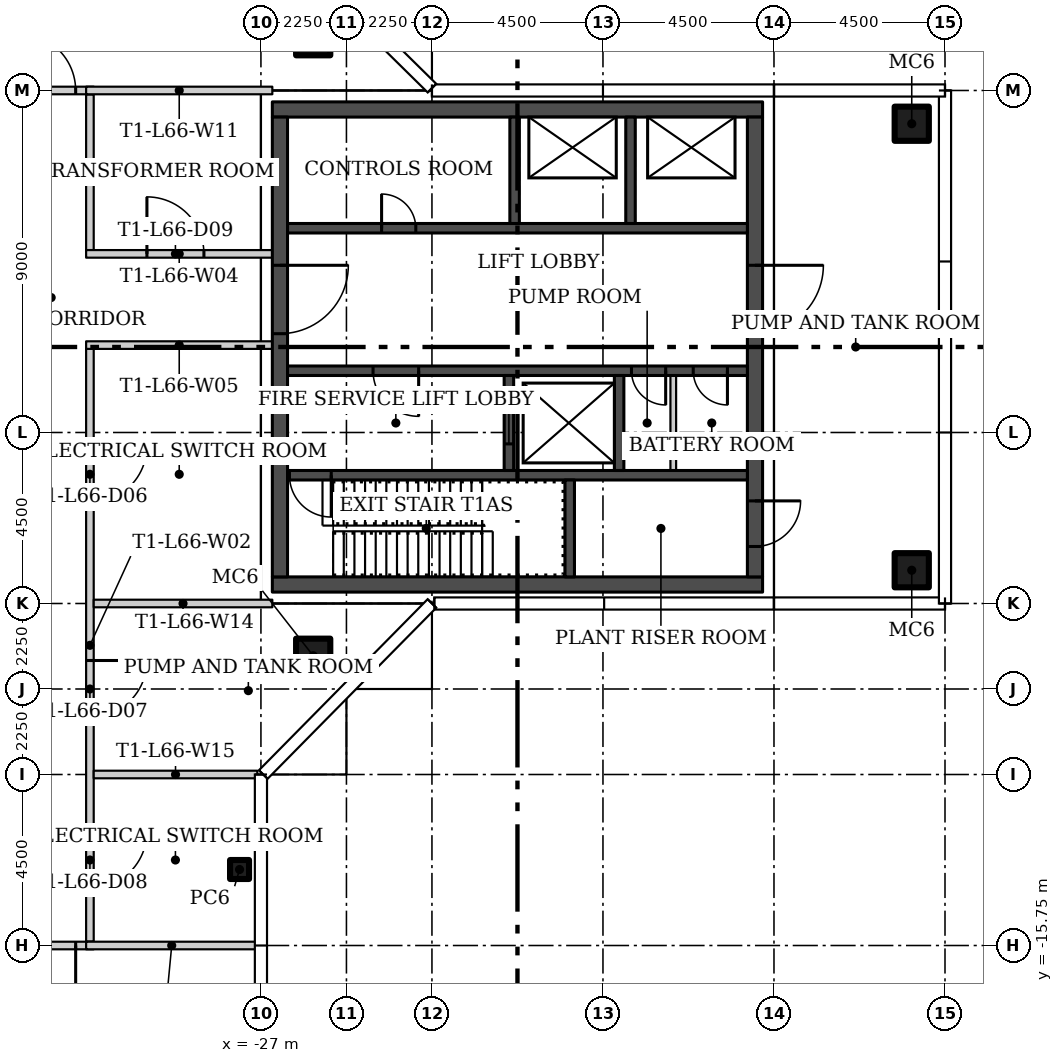
"""IFC4 building model, lengths in metres.
Left out: names, types, materials, properties, quantities, classifications, styles, units other than length and angle.
Written with IfcOpenShell. Run it as: python <this file> out.ifc"""

import sys

from ifc_helpers import new_model, si_unit, direction, frame, frame_2d, origin, origin_2d, place, context, subcontext, project, spatial, rectangle, hollow_rectangle, extrude, element, fill, save


model = new_model("IFC4")
c1 = context("Model", 3, precision=1e-05, world=origin(), true_north=direction((0.0, 1.0)))
c2 = subcontext(c1, "Body", "Model", "MODEL_VIEW")
j1 = project(units=[si_unit("LENGTHUNIT", "METRE"), si_unit("PLANEANGLEUNIT", "RADIAN")], contexts=[c1])
p1 = place(None, origin())
s1 = spatial("IfcSite", under=j1, at=p1, CompositionType="ELEMENT")
p2 = place(p1, origin())
s2 = spatial("IfcBuilding", under=s1, at=p2, CompositionType="ELEMENT")
p3 = place(p2, frame((0.0, 0.0, 273.3)))
s3 = spatial("IfcBuildingStorey", under=s2, at=p3, CompositionType="ELEMENT", Elevation=273.3)
for number, where in (
    (1, (-25.625, 8.125, 0.0)),
    (2, (-25.625, -8.125, 0.0)),
    (3, (-9.875, -5.875, 0.0)),
    (4, (-9.875, 5.875, 0.0)),
):
    element("IfcColumn", number, at=place(p3, frame(where)), inside=s3, PredefinedType="COLUMN", context=c2, shape_type="SweptSolid", body=[
        extrude(hollow_rectangle(XDim=0.9, YDim=0.9, WallThickness=0.036, at=origin_2d()), origin(), (0.0, 0.0, 1.0), 4.55),
    ])
p4 = place(p3, frame((-27.562, -13.75, 0.0)))
e5 = element("IfcColumn", 5, at=p4, inside=s3, PredefinedType="COLUMN", context=c2, shape_type="SweptSolid", body=[
    extrude(hollow_rectangle(XDim=0.5, YDim=0.5, WallThickness=0.016, at=origin_2d()), origin(), (0.0, 0.0, 1.0), 4.55),
])
p5 = place(p3, frame((-31.5, 6.65, 0.0), z_axis=(0.0, 0.0, 1.0), x_axis=(0.0, -1.0, 0.0)))
e6 = element("IfcWall", 6, at=p5, inside=s3, PredefinedType="PARTITIONING", context=c2, shape_type="SweptSolid", body=[
    extrude(rectangle(XDim=4.1, YDim=0.2, at=frame_2d((2.05, 0.0))), origin(), (0.0, 0.0, 1.0), 4.55),
])
p6 = place(p3, frame((-31.5, -0.05, 0.0), z_axis=(0.0, 0.0, 1.0), x_axis=(0.0, -1.0, 0.0)))
e7 = element("IfcWall", 7, at=p6, inside=s3, PredefinedType="PARTITIONING", context=c2, shape_type="SweptSolid", body=[
    extrude(rectangle(XDim=15.6, YDim=0.2, at=frame_2d((7.8, 0.0))), origin(), (0.0, 0.0, 1.0), 4.55),
])
p7 = place(p6, frame((2.55, 0.0, 0.0)))
e8 = element("IfcOpeningElement", 8, at=p7, cuts=e7, PredefinedType="OPENING", context=c2, shape_type="SweptSolid", body=[
    extrude(rectangle(XDim=1.5, YDim=2.4, at=frame_2d((0.75, 1.2))), frame((0.0, 0.11, 0.0), z_axis=(0.0, -1.0, 0.0), x_axis=(1.0, 0.0, 0.0)), (0.0, 0.0, 1.0), 0.22),
])
p8 = place(p6, frame((8.2, 0.0, 0.0)))
e9 = element("IfcOpeningElement", 9, at=p8, cuts=e7, PredefinedType="OPENING", context=c2, shape_type="SweptSolid", body=[
    extrude(rectangle(XDim=1.5, YDim=2.4, at=frame_2d((0.75, 1.2))), frame((0.0, 0.11, 0.0), z_axis=(0.0, -1.0, 0.0), x_axis=(1.0, 0.0, 0.0)), (0.0, 0.0, 1.0), 0.22),
])
p9 = place(p6, frame((12.7, 0.0, 0.0)))
e10 = element("IfcOpeningElement", 10, at=p9, cuts=e7, PredefinedType="OPENING", context=c2, shape_type="SweptSolid", body=[
    extrude(rectangle(XDim=1.5, YDim=2.4, at=frame_2d((0.75, 1.2))), frame((0.0, 0.11, 0.0), z_axis=(0.0, -1.0, 0.0), x_axis=(1.0, 0.0, 0.0)), (0.0, 0.0, 1.0), 0.22),
])
p10 = place(p3, frame((-31.6, 2.45, 0.0)))
e11 = element("IfcWall", 11, at=p10, inside=s3, PredefinedType="PARTITIONING", context=c2, shape_type="SweptSolid", body=[
    extrude(rectangle(XDim=4.9, YDim=0.2, at=frame_2d((2.45, 0.0))), origin(), (0.0, 0.0, 1.0), 4.55),
])
p11 = place(p10, frame((1.6, 0.0, 0.0)))
e12 = element("IfcOpeningElement", 12, at=p11, cuts=e11, PredefinedType="OPENING", context=c2, shape_type="SweptSolid", body=[
    extrude(rectangle(XDim=1.5, YDim=2.4, at=frame_2d((0.75, 1.2))), frame((0.0, 0.11, 0.0), z_axis=(0.0, -1.0, 0.0), x_axis=(1.0, 0.0, 0.0)), (0.0, 0.0, 1.0), 0.22),
])
p12 = place(p3, frame((-26.7, 0.05, 0.0), z_axis=(0.0, 0.0, 1.0), x_axis=(-1.0, 0.0, 0.0)))
e13 = element("IfcWall", 13, at=p12, inside=s3, PredefinedType="PARTITIONING", context=c2, shape_type="SweptSolid", body=[
    extrude(rectangle(XDim=4.9, YDim=0.2, at=frame_2d((2.45, 0.0))), origin(), (0.0, 0.0, 1.0), 4.55),
])
p13 = place(p3, frame((-33.85, 6.75, 0.0)))
e14 = element("IfcWall", 14, at=p13, inside=s3, PredefinedType="PARTITIONING", context=c2, shape_type="SweptSolid", body=[
    extrude(rectangle(XDim=2.45, YDim=0.2, at=frame_2d((1.225, 0.0))), origin(), (0.0, 0.0, 1.0), 4.55),
])
p14 = place(p13, frame((0.475, 0.0, 0.0)))
e15 = element("IfcOpeningElement", 15, at=p14, cuts=e14, PredefinedType="OPENING", context=c2, shape_type="SweptSolid", body=[
    extrude(rectangle(XDim=1.5, YDim=2.4, at=frame_2d((0.75, 1.2))), frame((0.0, 0.11, 0.0), z_axis=(0.0, -1.0, 0.0), x_axis=(1.0, 0.0, 0.0)), (0.0, 0.0, 1.0), 0.22),
])
p15 = place(p3, frame((-31.4, -15.75, 0.0), z_axis=(0.0, 0.0, 1.0), x_axis=(-1.0, 0.0, 0.0)))
e16 = element("IfcWall", 16, at=p15, inside=s3, PredefinedType="PARTITIONING", context=c2, shape_type="SweptSolid", body=[
    extrude(rectangle(XDim=2.45, YDim=0.2, at=frame_2d((1.225, 0.0))), origin(), (0.0, 0.0, 1.0), 4.55),
])
p16 = place(p15, frame((0.475, 0.0, 0.0)))
e17 = element("IfcOpeningElement", 17, at=p16, cuts=e16, PredefinedType="OPENING", context=c2, shape_type="SweptSolid", body=[
    extrude(rectangle(XDim=1.5, YDim=2.4, at=frame_2d((0.75, 1.2))), frame((0.0, 0.11, 0.0), z_axis=(0.0, -1.0, 0.0), x_axis=(1.0, 0.0, 0.0)), (0.0, 0.0, 1.0), 0.22),
])
p17 = place(p3, frame((-26.7, 6.75, 0.0), z_axis=(0.0, 0.0, 1.0), x_axis=(-1.0, 0.0, 0.0)))
e18 = element("IfcWall", 18, at=p17, inside=s3, PredefinedType="PARTITIONING", context=c2, shape_type="SweptSolid", body=[
    extrude(rectangle(XDim=4.9, YDim=0.2, at=frame_2d((2.45, 0.0))), origin(), (0.0, 0.0, 1.0), 4.55),
])
p18 = place(p3, frame((-31.4, -6.75, 0.0)))
e19 = element("IfcWall", 19, at=p18, inside=s3, PredefinedType="PARTITIONING", context=c2, shape_type="SweptSolid", body=[
    extrude(rectangle(XDim=4.7, YDim=0.2, at=frame_2d((2.35, 0.0))), origin(), (0.0, 0.0, 1.0), 4.55),
])
p19 = place(p3, frame((-31.4, -11.25, 0.0)))
e20 = element("IfcWall", 20, at=p19, inside=s3, PredefinedType="PARTITIONING", context=c2, shape_type="SweptSolid", body=[
    extrude(rectangle(XDim=4.305, YDim=0.2, at=frame_2d((2.152, 0.0))), origin(), (0.0, 0.0, 1.0), 4.55),
])
p20 = place(p3, frame((-31.6, -15.75, 0.0)))
e21 = element("IfcWall", 21, at=p20, inside=s3, PredefinedType="PARTITIONING", context=c2, shape_type="SweptSolid", body=[
    extrude(rectangle(XDim=4.505, YDim=0.2, at=frame_2d((2.252, 0.0))), origin(), (0.0, 0.0, 1.0), 4.55),
])
for number, where in (
    (22, (-26.7, -6.25, 0.0)),
    (23, (-26.7, 6.25, 0.0)),
):
    element("IfcWall", number, at=place(p3, frame(where)), inside=s3, PredefinedType="SHEAR", context=c2, shape_type="SweptSolid", body=[
        extrude(rectangle(XDim=12.9, YDim=0.4, at=frame_2d((6.45, 0.0))), origin(), (0.0, 0.0, 1.0), 4.55),
    ])
p21 = place(p3, frame((-26.5, 6.05, 0.0), z_axis=(0.0, 0.0, 1.0), x_axis=(0.0, -1.0, 0.0)))
e24 = element("IfcWall", 24, at=p21, inside=s3, PredefinedType="SHEAR", context=c2, shape_type="SweptSolid", body=[
    extrude(rectangle(XDim=12.1, YDim=0.4, at=frame_2d((6.05, 0.0))), origin(), (0.0, 0.0, 1.0), 4.55),
])
p22 = place(p21, frame((3.9, 0.0, 0.0)))
e25 = element("IfcOpeningElement", 25, at=p22, cuts=e24, PredefinedType="OPENING", context=c2, shape_type="SweptSolid", body=[
    extrude(rectangle(XDim=1.8, YDim=2.4, at=frame_2d((0.9, 1.2))), frame((0.0, 0.21, 0.0), z_axis=(0.0, -1.0, 0.0), x_axis=(1.0, 0.0, 0.0)), (0.0, 0.0, 1.0), 0.42),
])
p23 = place(p3, frame((-14.0, 6.05, 0.0), z_axis=(0.0, 0.0, 1.0), x_axis=(0.0, -1.0, 0.0)))
e26 = element("IfcWall", 26, at=p23, inside=s3, PredefinedType="SHEAR", context=c2, shape_type="SweptSolid", body=[
    extrude(rectangle(XDim=12.1, YDim=0.4, at=frame_2d((6.05, 0.0))), origin(), (0.0, 0.0, 1.0), 4.55),
])
p24 = place(p23, frame((10.1, 0.0, 0.0)))
e27 = element("IfcOpeningElement", 27, at=p24, cuts=e26, PredefinedType="OPENING", context=c2, shape_type="SweptSolid", body=[
    extrude(rectangle(XDim=1.2, YDim=2.1, at=frame_2d((0.6, 1.05))), frame((0.0, 0.21, 0.0), z_axis=(0.0, -1.0, 0.0), x_axis=(1.0, 0.0, 0.0)), (0.0, 0.0, 1.0), 0.42),
])
p25 = place(p23, frame((3.9, 0.0, 0.0)))
e28 = element("IfcOpeningElement", 28, at=p25, cuts=e26, PredefinedType="OPENING", context=c2, shape_type="SweptSolid", body=[
    extrude(rectangle(XDim=1.8, YDim=2.4, at=frame_2d((0.9, 1.2))), frame((0.0, 0.21, 0.0), z_axis=(0.0, -1.0, 0.0), x_axis=(1.0, 0.0, 0.0)), (0.0, 0.0, 1.0), 0.42),
])
p26 = place(p3, frame((-14.2, -3.375, 0.0), z_axis=(0.0, 0.0, 1.0), x_axis=(-1.0, 0.0, 0.0)))
e29 = element("IfcWall", 29, at=p26, inside=s3, PredefinedType="SHEAR", context=c2, shape_type="SweptSolid", body=[
    extrude(rectangle(XDim=12.1, YDim=0.25, at=frame_2d((6.05, 0.0))), origin(), (0.0, 0.0, 1.0), 4.55),
])
p27 = place(p26, frame((10.95, 0.0, 0.0)))
e30 = element("IfcOpeningElement", 30, at=p27, cuts=e29, PredefinedType="OPENING", context=c2, shape_type="SweptSolid", body=[
    extrude(rectangle(XDim=1.1, YDim=2.1, at=frame_2d((0.55, 1.05))), frame((0.0, 0.135, 0.0), z_axis=(0.0, -1.0, 0.0), x_axis=(1.0, 0.0, 0.0)), (0.0, 0.0, 1.0), 0.27),
])
p28 = place(p3, frame((-18.875, -6.05, 0.0), z_axis=(0.0, 0.0, 1.0), x_axis=(0.0, 1.0, 0.0)))
e31 = element("IfcWall", 31, at=p28, inside=s3, PredefinedType="SHEAR", context=c2, shape_type="SweptSolid", body=[
    extrude(rectangle(XDim=2.55, YDim=0.25, at=frame_2d((1.275, 0.0))), origin(), (0.0, 0.0, 1.0), 4.55),
])
p29 = place(p3, frame((-14.2, -0.625, 0.0), z_axis=(0.0, 0.0, 1.0), x_axis=(-1.0, 0.0, 0.0)))
e32 = element("IfcWall", 32, at=p29, inside=s3, PredefinedType="SHEAR", context=c2, shape_type="SweptSolid", body=[
    extrude(rectangle(XDim=12.1, YDim=0.25, at=frame_2d((6.05, 0.0))), origin(), (0.0, 0.0, 1.0), 4.55),
])
p30 = place(p29, frame((8.65, 0.0, 0.0)))
e33 = element("IfcOpeningElement", 33, at=p30, cuts=e32, PredefinedType="OPENING", context=c2, shape_type="SweptSolid", body=[
    extrude(rectangle(XDim=1.2, YDim=2.1, at=frame_2d((0.6, 1.05))), frame((0.0, 0.135, 0.0), z_axis=(0.0, -1.0, 0.0), x_axis=(1.0, 0.0, 0.0)), (0.0, 0.0, 1.0), 0.27),
])
p31 = place(p29, frame((2.15, 0.0, 0.0)))
e34 = element("IfcOpeningElement", 34, at=p31, cuts=e32, PredefinedType="OPENING", context=c2, shape_type="SweptSolid", body=[
    extrude(rectangle(XDim=0.9, YDim=2.1, at=frame_2d((0.45, 1.05))), frame((0.0, 0.135, 0.0), z_axis=(0.0, -1.0, 0.0), x_axis=(1.0, 0.0, 0.0)), (0.0, 0.0, 1.0), 0.27),
])
p32 = place(p29, frame((0.525, 0.0, 0.0)))
e35 = element("IfcOpeningElement", 35, at=p32, cuts=e32, PredefinedType="OPENING", context=c2, shape_type="SweptSolid", body=[
    extrude(rectangle(XDim=0.9, YDim=2.1, at=frame_2d((0.45, 1.05))), frame((0.0, 0.135, 0.0), z_axis=(0.0, -1.0, 0.0), x_axis=(1.0, 0.0, 0.0)), (0.0, 0.0, 1.0), 0.27),
])
p33 = place(p3, frame((-20.475, -3.25, 0.0), z_axis=(0.0, 0.0, 1.0), x_axis=(0.0, 1.0, 0.0)))
e36 = element("IfcWall", 36, at=p33, inside=s3, PredefinedType="SHEAR", context=c2, shape_type="SweptSolid", body=[
    extrude(rectangle(XDim=2.5, YDim=0.25, at=frame_2d((1.25, 0.0))), origin(), (0.0, 0.0, 1.0), 4.55),
])
p34 = place(p33, frame((0.7, 0.0, 0.0)))
e37 = element("IfcOpeningElement", 37, at=p34, cuts=e36, PredefinedType="OPENING", context=c2, shape_type="SweptSolid", body=[
    extrude(rectangle(XDim=1.1, YDim=2.1, at=frame_2d((0.55, 1.05))), frame((0.0, 0.135, 0.0), z_axis=(0.0, -1.0, 0.0), x_axis=(1.0, 0.0, 0.0)), (0.0, 0.0, 1.0), 0.27),
])
p35 = place(p3, frame((-17.575, -3.25, 0.0), z_axis=(0.0, 0.0, 1.0), x_axis=(0.0, 1.0, 0.0)))
e38 = element("IfcWall", 38, at=p35, inside=s3, PredefinedType="SHEAR", context=c2, shape_type="SweptSolid", body=[
    extrude(rectangle(XDim=2.5, YDim=0.25, at=frame_2d((1.25, 0.0))), origin(), (0.0, 0.0, 1.0), 4.55),
])
p36 = place(p3, frame((-16.15, -3.25, 0.0), z_axis=(0.0, 0.0, 1.0), x_axis=(0.0, 1.0, 0.0)))
e39 = element("IfcWall", 39, at=p36, inside=s3, PredefinedType="PARTITIONING", context=c2, shape_type="SweptSolid", body=[
    extrude(rectangle(XDim=2.5, YDim=0.15, at=frame_2d((1.25, 0.0))), origin(), (0.0, 0.0, 1.0), 4.55),
])
p37 = place(p3, frame((-26.3, 3.125, 0.0)))
e40 = element("IfcWall", 40, at=p37, inside=s3, PredefinedType="SHEAR", context=c2, shape_type="SweptSolid", body=[
    extrude(rectangle(XDim=12.1, YDim=0.25, at=frame_2d((6.05, 0.0))), origin(), (0.0, 0.0, 1.0), 4.55),
])
p38 = place(p37, frame((2.475, 0.0, 0.0)))
e41 = element("IfcOpeningElement", 41, at=p38, cuts=e40, PredefinedType="OPENING", context=c2, shape_type="SweptSolid", body=[
    extrude(rectangle(XDim=0.9, YDim=2.1, at=frame_2d((0.45, 1.05))), frame((0.0, 0.135, 0.0), z_axis=(0.0, -1.0, 0.0), x_axis=(1.0, 0.0, 0.0)), (0.0, 0.0, 1.0), 0.27),
])
for number, where, z_axis, x_axis in (
    (42, (-20.325, 3.25, 0.0), (0.0, 0.0, 1.0), (0.0, 1.0, 0.0)),
    (43, (-17.275, 3.25, 0.0), (0.0, 0.0, 1.0), (0.0, 1.0, 0.0)),
):
    element("IfcWall", number, at=place(p3, frame(where, z_axis=z_axis, x_axis=x_axis)), inside=s3, PredefinedType="SHEAR", context=c2, shape_type="SweptSolid", body=[
        extrude(rectangle(XDim=2.8, YDim=0.25, at=frame_2d((1.4, 0.0))), origin(), (0.0, 0.0, 1.0), 4.55),
    ])
p39 = place(p14, origin())
e44 = element("IfcDoor", 44, at=p39, inside=s3, OperationType="DOUBLE_DOOR_SINGLE_SWING", PredefinedType="DOOR", context=c2, shape_type="SweptSolid", body=[
    extrude(rectangle(XDim=1.5, YDim=2.4, at=frame_2d((0.75, 1.2))), frame((0.0, 0.025, 0.0), z_axis=(0.0, -1.0, 0.0), x_axis=(1.0, 0.0, 0.0)), (0.0, 0.0, 1.0), 0.05),
])
fill(e15, e44)
p40 = place(p16, origin())
e45 = element("IfcDoor", 45, at=p40, inside=s3, OperationType="DOUBLE_DOOR_SINGLE_SWING", PredefinedType="DOOR", context=c2, shape_type="SweptSolid", body=[
    extrude(rectangle(XDim=1.5, YDim=2.4, at=frame_2d((0.75, 1.2))), frame((0.0, 0.025, 0.0), z_axis=(0.0, -1.0, 0.0), x_axis=(1.0, 0.0, 0.0)), (0.0, 0.0, 1.0), 0.05),
])
fill(e17, e45)
p41 = place(p7, origin())
e46 = element("IfcDoor", 46, at=p41, inside=s3, OperationType="DOUBLE_DOOR_SINGLE_SWING", PredefinedType="DOOR", context=c2, shape_type="SweptSolid", body=[
    extrude(rectangle(XDim=1.5, YDim=2.4, at=frame_2d((0.75, 1.2))), frame((0.0, 0.025, 0.0), z_axis=(0.0, -1.0, 0.0), x_axis=(1.0, 0.0, 0.0)), (0.0, 0.0, 1.0), 0.05),
])
fill(e8, e46)
p42 = place(p8, origin())
e47 = element("IfcDoor", 47, at=p42, inside=s3, OperationType="DOUBLE_DOOR_SINGLE_SWING", PredefinedType="DOOR", context=c2, shape_type="SweptSolid", body=[
    extrude(rectangle(XDim=1.5, YDim=2.4, at=frame_2d((0.75, 1.2))), frame((0.0, 0.025, 0.0), z_axis=(0.0, -1.0, 0.0), x_axis=(1.0, 0.0, 0.0)), (0.0, 0.0, 1.0), 0.05),
])
fill(e9, e47)
p43 = place(p9, origin())
e48 = element("IfcDoor", 48, at=p43, inside=s3, OperationType="DOUBLE_DOOR_SINGLE_SWING", PredefinedType="DOOR", context=c2, shape_type="SweptSolid", body=[
    extrude(rectangle(XDim=1.5, YDim=2.4, at=frame_2d((0.75, 1.2))), frame((0.0, 0.025, 0.0), z_axis=(0.0, -1.0, 0.0), x_axis=(1.0, 0.0, 0.0)), (0.0, 0.0, 1.0), 0.05),
])
fill(e10, e48)
p44 = place(p11, origin())
e49 = element("IfcDoor", 49, at=p44, inside=s3, OperationType="DOUBLE_DOOR_SINGLE_SWING", PredefinedType="DOOR", context=c2, shape_type="SweptSolid", body=[
    extrude(rectangle(XDim=1.5, YDim=2.4, at=frame_2d((0.75, 1.2))), frame((0.0, 0.025, 0.0), z_axis=(0.0, -1.0, 0.0), x_axis=(1.0, 0.0, 0.0)), (0.0, 0.0, 1.0), 0.05),
])
fill(e12, e49)
p45 = place(p22, origin())
e50 = element("IfcDoor", 50, at=p45, inside=s3, OperationType="DOUBLE_DOOR_SINGLE_SWING", PredefinedType="DOOR", context=c2, shape_type="SweptSolid", body=[
    extrude(rectangle(XDim=1.8, YDim=2.4, at=frame_2d((0.9, 1.2))), frame((0.0, 0.025, 0.0), z_axis=(0.0, -1.0, 0.0), x_axis=(1.0, 0.0, 0.0)), (0.0, 0.0, 1.0), 0.05),
])
fill(e25, e50)
p46 = place(p24, origin())
e51 = element("IfcDoor", 51, at=p46, inside=s3, OperationType="SINGLE_SWING_RIGHT", PredefinedType="DOOR", context=c2, shape_type="SweptSolid", body=[
    extrude(rectangle(XDim=1.2, YDim=2.1, at=frame_2d((0.6, 1.05))), frame((0.0, 0.025, 0.0), z_axis=(0.0, -1.0, 0.0), x_axis=(1.0, 0.0, 0.0)), (0.0, 0.0, 1.0), 0.05),
])
fill(e27, e51)
p47 = place(p25, origin())
e52 = element("IfcDoor", 52, at=p47, inside=s3, OperationType="DOUBLE_DOOR_SINGLE_SWING", PredefinedType="DOOR", context=c2, shape_type="SweptSolid", body=[
    extrude(rectangle(XDim=1.8, YDim=2.4, at=frame_2d((0.9, 1.2))), frame((0.0, 0.025, 0.0), z_axis=(0.0, -1.0, 0.0), x_axis=(1.0, 0.0, 0.0)), (0.0, 0.0, 1.0), 0.05),
])
fill(e28, e52)
p48 = place(p27, origin())
e53 = element("IfcDoor", 53, at=p48, inside=s3, OperationType="SINGLE_SWING_RIGHT", PredefinedType="DOOR", context=c2, shape_type="SweptSolid", body=[
    extrude(rectangle(XDim=1.1, YDim=2.1, at=frame_2d((0.55, 1.05))), frame((0.0, 0.025, 0.0), z_axis=(0.0, -1.0, 0.0), x_axis=(1.0, 0.0, 0.0)), (0.0, 0.0, 1.0), 0.05),
])
fill(e30, e53)
p49 = place(p30, origin())
e54 = element("IfcDoor", 54, at=p49, inside=s3, OperationType="SINGLE_SWING_RIGHT", PredefinedType="DOOR", context=c2, shape_type="SweptSolid", body=[
    extrude(rectangle(XDim=1.2, YDim=2.1, at=frame_2d((0.6, 1.05))), frame((0.0, 0.025, 0.0), z_axis=(0.0, -1.0, 0.0), x_axis=(1.0, 0.0, 0.0)), (0.0, 0.0, 1.0), 0.05),
])
fill(e33, e54)
p50 = place(p31, origin())
e55 = element("IfcDoor", 55, at=p50, inside=s3, OperationType="SINGLE_SWING_LEFT", PredefinedType="DOOR", context=c2, shape_type="SweptSolid", body=[
    extrude(rectangle(XDim=0.9, YDim=2.1, at=frame_2d((0.45, 1.05))), frame((0.0, 0.025, 0.0), z_axis=(0.0, -1.0, 0.0), x_axis=(1.0, 0.0, 0.0)), (0.0, 0.0, 1.0), 0.05),
])
fill(e34, e55)
p51 = place(p32, origin())
e56 = element("IfcDoor", 56, at=p51, inside=s3, OperationType="SINGLE_SWING_LEFT", PredefinedType="DOOR", context=c2, shape_type="SweptSolid", body=[
    extrude(rectangle(XDim=0.9, YDim=2.1, at=frame_2d((0.45, 1.05))), frame((0.0, 0.025, 0.0), z_axis=(0.0, -1.0, 0.0), x_axis=(1.0, 0.0, 0.0)), (0.0, 0.0, 1.0), 0.05),
])
fill(e35, e56)
p52 = place(p34, origin())
e57 = element("IfcDoor", 57, at=p52, inside=s3, OperationType="SLIDING_TO_LEFT", PredefinedType="DOOR", context=c2, shape_type="SweptSolid", body=[
    extrude(rectangle(XDim=1.1, YDim=2.1, at=frame_2d((0.55, 1.05))), frame((0.0, 0.025, 0.0), z_axis=(0.0, -1.0, 0.0), x_axis=(1.0, 0.0, 0.0)), (0.0, 0.0, 1.0), 0.05),
])
fill(e37, e57)
p53 = place(p38, origin())
e58 = element("IfcDoor", 58, at=p53, inside=s3, OperationType="SINGLE_SWING_LEFT", PredefinedType="DOOR", context=c2, shape_type="SweptSolid", body=[
    extrude(rectangle(XDim=0.9, YDim=2.1, at=frame_2d((0.45, 1.05))), frame((0.0, 0.025, 0.0), z_axis=(0.0, -1.0, 0.0), x_axis=(1.0, 0.0, 0.0)), (0.0, 0.0, 1.0), 0.05),
])
fill(e41, e58)
save(model, sys.argv[1])
